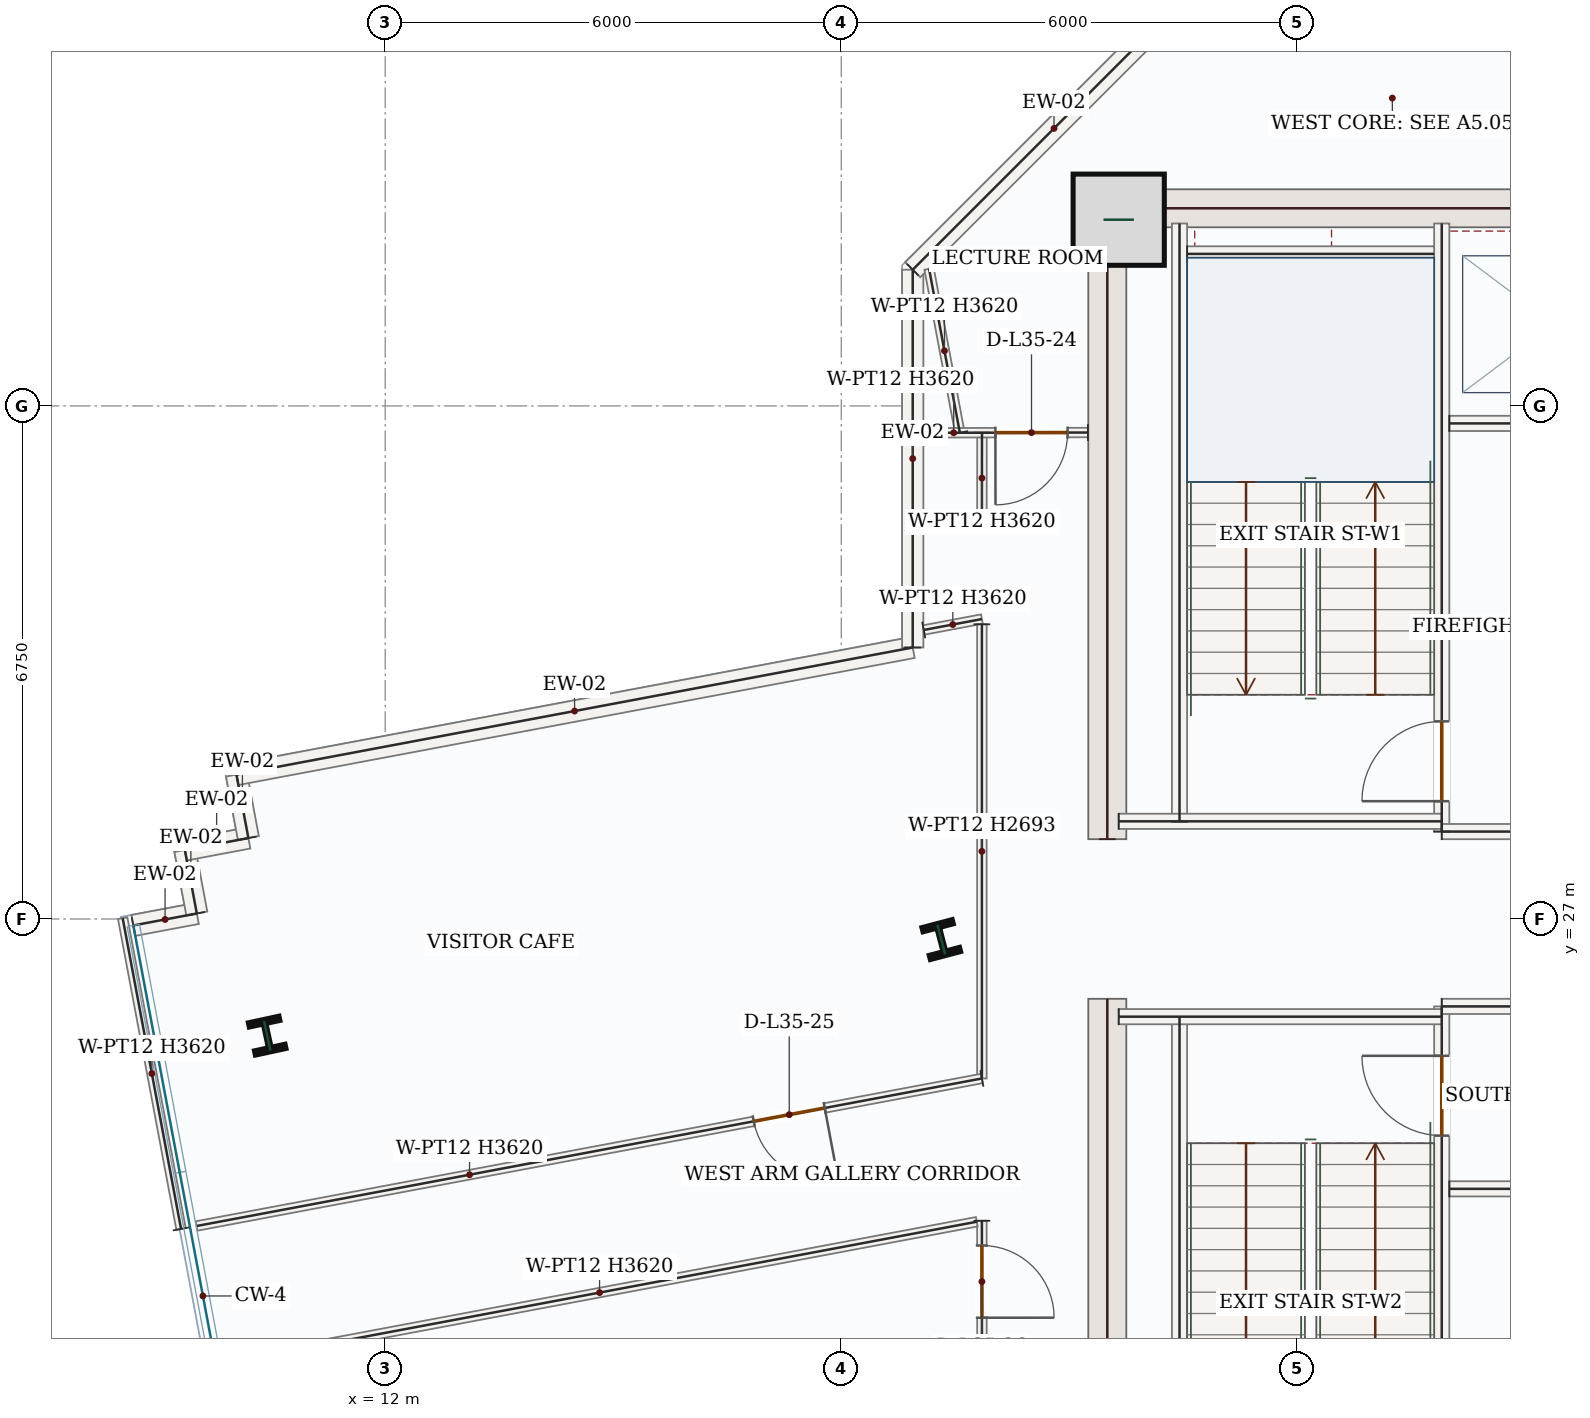
"""IFC4 building model, lengths in metres.
Left out: names, types, materials, properties, quantities, classifications, styles, units other than length and angle.
Written with IfcOpenShell. Run it as: python <this file> out.ifc"""

import sys

from ifc_helpers import new_model, si_unit, direction, frame, frame_2d, origin, origin_2d, place, context, subcontext, project, spatial, rectangle, i_section, extrude, source, transform, mapped, element, fill, save


model = new_model("IFC4")
c1 = context("Model", 3, precision=1e-05, world=origin(), true_north=direction((0.0, 1.0)))
c2 = subcontext(c1, "Body", "Model", "MODEL_VIEW")
j1 = project(units=[si_unit("LENGTHUNIT", "METRE"), si_unit("PLANEANGLEUNIT", "RADIAN")], contexts=[c1])
p1 = place(None, origin())
s1 = spatial("IfcSite", under=j1, at=p1, CompositionType="ELEMENT")
p2 = place(p1, origin())
s2 = spatial("IfcBuilding", under=s1, at=p2, CompositionType="ELEMENT")
p3 = place(p2, frame((0.0, 0.0, 155.1)))
s3 = spatial("IfcBuildingStorey", under=s2, at=p3, CompositionType="ELEMENT", Elevation=155.1)
m1 = source(origin(), c2, "Body", "SweptSolid", [
    extrude(rectangle(XDim=8.55, YDim=0.5, at=frame_2d((4.275, 0.0))), origin(), (0.0, 0.0, 1.0), 3.62),
])
for number, where, z_axis, x_axis in (
    (1, (21.5, 17.4, 0.0), (0.0, 0.0, 1.0), (0.0, 1.0, 0.0)),
    (2, (21.5, 28.05, 0.0), (0.0, 0.0, 1.0), (0.0, 1.0, 0.0)),
):
    element("IfcWall", number, at=place(p3, frame(where, z_axis=z_axis, x_axis=x_axis)), inside=s3, PredefinedType="SHEAR", context=c2, shape_type="MappedRepresentation", body=[
        mapped(m1, transform((0.0, 0.0, 0.0), x_axis=(1.0, 0.0, 0.0), y_axis=(0.0, 1.0, 0.0), z_axis=(0.0, 0.0, 1.0), scale=1.0)),
    ])
m2 = source(origin(), c2, "Body", "SweptSolid", [
    extrude(rectangle(XDim=7.0, YDim=0.5, at=frame_2d((3.5, 0.0))), origin(), (0.0, 0.0, 1.0), 3.62),
])
p4 = place(p3, frame((21.75, 36.35, 0.0), z_axis=(0.0, 0.0, 1.0), x_axis=(1.0, 0.0, 0.0)))
e3 = element("IfcWall", 3, at=p4, inside=s3, PredefinedType="SHEAR", context=c2, shape_type="MappedRepresentation", body=[
    mapped(m2, transform((0.0, 0.0, 0.0), x_axis=(1.0, 0.0, 0.0), y_axis=(0.0, 1.0, 0.0), z_axis=(0.0, 0.0, 1.0), scale=1.0)),
])
m3 = source(origin(), c2, "Body", "SweptSolid", [
    extrude(rectangle(XDim=1.2, YDim=1.2, at=origin_2d()), origin(), (0.0, 0.0, 1.0), 3.9),
])
p5 = place(p3, frame((21.65, 36.2, 0.0), z_axis=(0.0, 0.0, 1.0), x_axis=(1.0, 0.0, 0.0)))
e4 = element("IfcColumn", 4, at=p5, inside=s3, PredefinedType="COLUMN", context=c2, shape_type="MappedRepresentation", body=[
    mapped(m3, transform((0.0, 0.0, 0.0), x_axis=(1.0, 0.0, 0.0), y_axis=(0.0, 1.0, 0.0), z_axis=(0.0, 0.0, 1.0), scale=1.0)),
])
m4 = source(origin(), c2, "Body", "SweptSolid", [
    extrude(i_section(OverallWidth=0.412, OverallDepth=0.435, WebThickness=0.036, FlangeThickness=0.057, FilletRadius=0.018, at=origin_2d()), origin(), (0.0, 0.0, 1.0), 3.9),
])
for number, where, z_axis, x_axis in (
    (5, (19.316, 26.729, 0.0), (0.0, 0.0, 1.0), (0.967, 0.255, 0.0)),
    (6, (10.447, 25.465, 0.0), (0.0, 0.0, 1.0), (0.977, 0.211, 0.0)),
):
    element("IfcColumn", number, at=place(p3, frame(where, z_axis=z_axis, x_axis=x_axis)), inside=s3, PredefinedType="COLUMN", context=c2, shape_type="MappedRepresentation", body=[
        mapped(m4, transform((0.0, 0.0, 0.0), x_axis=(1.0, 0.0, 0.0), y_axis=(0.0, 1.0, 0.0), z_axis=(0.0, 0.0, 1.0), scale=1.0)),
    ])
m5 = source(origin(), c2, "Body", "SweptSolid", [
    extrude(rectangle(XDim=0.85, YDim=0.28, at=frame_2d((0.425, 0.0))), origin(), (0.0, 0.0, 1.0), 3.62),
])
for number, where, z_axis, x_axis in (
    (7, (8.686, 26.915, 0.0), (0.0, 0.0, 1.0), (0.983, 0.185, 0.0)),
    (8, (9.521, 27.072, 0.0), (0.0, 0.0, 1.0), (-0.185, 0.983, 0.0)),
):
    element("IfcWall", number, at=place(p3, frame(where, z_axis=z_axis, x_axis=x_axis)), inside=s3, PredefinedType="SOLIDWALL", context=c2, shape_type="MappedRepresentation", body=[
        mapped(m5, transform((0.0, 0.0, 0.0), x_axis=(1.0, 0.0, 0.0), y_axis=(0.0, 1.0, 0.0), z_axis=(0.0, 0.0, 1.0), scale=1.0)),
    ])
m6 = source(origin(), c2, "Body", "SweptSolid", [
    extrude(rectangle(XDim=0.85, YDim=0.28, at=frame_2d((0.425, 0.0))), origin(), (0.0, 0.0, 1.0), 3.62),
])
p6 = place(p3, frame((9.365, 27.908, 0.0), z_axis=(0.0, 0.0, 1.0), x_axis=(0.982790785128, 0.184722149909, 0.0)))
e9 = element("IfcWall", 9, at=p6, inside=s3, PredefinedType="SOLIDWALL", context=c2, shape_type="MappedRepresentation", body=[
    mapped(m6, transform((0.0, 0.0, 0.0), x_axis=(1.0, 0.0, 0.0), y_axis=(0.0, 1.0, 0.0), z_axis=(0.0, 0.0, 1.0), scale=1.0)),
])
p7 = place(p3, frame((10.2, 28.065, 0.0), z_axis=(0.0, 0.0, 1.0), x_axis=(-0.184392582027, 0.982852672425, 0.0)))
e10 = element("IfcWall", 10, at=p7, inside=s3, PredefinedType="SOLIDWALL", context=c2, shape_type="MappedRepresentation", body=[
    mapped(m5, transform((0.0, 0.0, 0.0), x_axis=(1.0, 0.0, 0.0), y_axis=(0.0, 1.0, 0.0), z_axis=(0.0, 0.0, 1.0), scale=1.0)),
])
m7 = source(origin(), c2, "Body", "SweptSolid", [
    extrude(rectangle(XDim=9.052, YDim=0.28, at=frame_2d((4.526, 0.0))), origin(), (0.0, 0.0, 1.0), 3.62),
])
p8 = place(p3, frame((10.043, 28.9, 0.0), z_axis=(0.0, 0.0, 1.0), x_axis=(0.982808012228, 0.184630471755, 0.0)))
e11 = element("IfcWall", 11, at=p8, inside=s3, PredefinedType="SOLIDWALL", context=c2, shape_type="MappedRepresentation", body=[
    mapped(m7, transform((0.0, 0.0, 0.0), x_axis=(1.0, 0.0, 0.0), y_axis=(0.0, 1.0, 0.0), z_axis=(0.0, 0.0, 1.0), scale=1.0)),
])
m8 = source(origin(), c2, "Body", "SweptSolid", [
    extrude(rectangle(XDim=4.97, YDim=0.28, at=frame_2d((2.485, 0.0))), origin(), (0.0, 0.0, 1.0), 3.62),
])
p9 = place(p3, frame((18.94, 30.572, 0.0), z_axis=(0.0, 0.0, 1.0), x_axis=(0.0, 1.0, 0.0)))
e12 = element("IfcWall", 12, at=p9, inside=s3, PredefinedType="SOLIDWALL", context=c2, shape_type="MappedRepresentation", body=[
    mapped(m8, transform((0.0, 0.0, 0.0), x_axis=(1.0, 0.0, 0.0), y_axis=(0.0, 1.0, 0.0), z_axis=(0.0, 0.0, 1.0), scale=1.0)),
])
m9 = source(origin(), c2, "Body", "SweptSolid", [
    extrude(rectangle(XDim=5.258, YDim=0.28, at=frame_2d((2.629, 0.0))), origin(), (0.0, 0.0, 1.0), 3.62),
])
p10 = place(p3, frame((18.94, 35.542, 0.0), z_axis=(0.0, 0.0, 1.0), x_axis=(0.707106781187, 0.707106781187, 0.0)))
e13 = element("IfcWall", 13, at=p10, inside=s3, PredefinedType="SOLIDWALL", context=c2, shape_type="MappedRepresentation", body=[
    mapped(m9, transform((0.0, 0.0, 0.0), x_axis=(1.0, 0.0, 0.0), y_axis=(0.0, 1.0, 0.0), z_axis=(0.0, 0.0, 1.0), scale=1.0)),
])
m10 = source(origin(), c2, "Body", "SweptSolid", [
    extrude(rectangle(XDim=7.87, YDim=0.2, at=frame_2d((3.935, 0.0))), origin(), (0.0, 0.0, 1.0), 3.62),
])
for number, where, z_axis, x_axis in (
    (14, (22.45, 17.85, 0.0), (0.0, 0.0, 1.0), (0.0, 1.0, 0.0)),
    (15, (22.45, 28.28, 0.0), (0.0, 0.0, 1.0), (0.0, 1.0, 0.0)),
):
    element("IfcWall", number, at=place(p3, frame(where, z_axis=z_axis, x_axis=x_axis)), inside=s3, PredefinedType="SOLIDWALL", context=c2, shape_type="MappedRepresentation", body=[
        mapped(m10, transform((0.0, 0.0, 0.0), x_axis=(1.0, 0.0, 0.0), y_axis=(0.0, 1.0, 0.0), z_axis=(0.0, 0.0, 1.0), scale=1.0)),
    ])
p11 = place(p3, frame((25.9, 17.85, 0.0), z_axis=(0.0, 0.0, 1.0), x_axis=(0.0, 1.0, 0.0)))
e16 = element("IfcWall", 16, at=p11, inside=s3, PredefinedType="SOLIDWALL", context=c2, shape_type="SweptSolid", body=[
    extrude(rectangle(XDim=8.0, YDim=0.2, at=frame_2d((4.0, 0.0))), origin(), (0.0, 0.0, 1.0), 3.62),
])
p12 = place(p11, frame((6.3, 0.0, 0.0)))
e17 = element("IfcOpeningElement", 17, at=p12, cuts=e16, PredefinedType="OPENING", context=c2, shape_type="SweptSolid", body=[
    extrude(rectangle(XDim=1.05, YDim=2.15, at=frame_2d((0.525, 1.075))), frame((0.0, 0.11, 0.0), z_axis=(0.0, -1.0, 0.0), x_axis=(1.0, 0.0, 0.0)), (0.0, 0.0, 1.0), 0.22),
])
p13 = place(p3, frame((25.9, 28.15, 0.0), z_axis=(0.0, 0.0, 1.0), x_axis=(0.0, 1.0, 0.0)))
e18 = element("IfcWall", 18, at=p13, inside=s3, PredefinedType="SOLIDWALL", context=c2, shape_type="SweptSolid", body=[
    extrude(rectangle(XDim=8.0, YDim=0.2, at=frame_2d((4.0, 0.0))), origin(), (0.0, 0.0, 1.0), 3.62),
])
p14 = place(p13, frame((0.4, 0.0, 0.0)))
e19 = element("IfcOpeningElement", 19, at=p14, cuts=e18, PredefinedType="OPENING", context=c2, shape_type="SweptSolid", body=[
    extrude(rectangle(XDim=1.05, YDim=2.15, at=frame_2d((0.525, 1.075))), frame((0.0, 0.11, 0.0), z_axis=(0.0, -1.0, 0.0), x_axis=(1.0, 0.0, 0.0)), (0.0, 0.0, 1.0), 0.22),
])
m11 = source(origin(), c2, "Body", "SweptSolid", [
    extrude(rectangle(XDim=4.25, YDim=0.2, at=frame_2d((2.125, 0.0))), origin(), (0.0, 0.0, 1.0), 3.62),
])
p15 = place(p3, frame((21.65, 25.715, 0.0), z_axis=(0.0, 0.0, 1.0), x_axis=(1.0, 0.0, 0.0)))
e20 = element("IfcWall", 20, at=p15, inside=s3, PredefinedType="SOLIDWALL", context=c2, shape_type="MappedRepresentation", body=[
    mapped(m11, transform((0.0, 0.0, 0.0), x_axis=(1.0, 0.0, 0.0), y_axis=(0.0, 1.0, 0.0), z_axis=(0.0, 0.0, 1.0), scale=1.0)),
])
m12 = source(origin(), c2, "Body", "SweptSolid", [
    extrude(rectangle(XDim=3.0, YDim=0.2, at=frame_2d((1.5, 0.0))), origin(), (0.0, 0.0, 1.0), 3.62),
])
p16 = place(p3, frame((25.9, 25.85, 0.0), z_axis=(0.0, 0.0, 1.0), x_axis=(1.0, 0.0, 0.0)))
e21 = element("IfcWall", 21, at=p16, inside=s3, PredefinedType="SOLIDWALL", context=c2, shape_type="MappedRepresentation", body=[
    mapped(m12, transform((0.0, 0.0, 0.0), x_axis=(1.0, 0.0, 0.0), y_axis=(0.0, 1.0, 0.0), z_axis=(0.0, 0.0, 1.0), scale=1.0)),
])
p17 = place(p3, frame((21.65, 28.285, 0.0), z_axis=(0.0, 0.0, 1.0), x_axis=(1.0, 0.0, 0.0)))
e22 = element("IfcWall", 22, at=p17, inside=s3, PredefinedType="SOLIDWALL", context=c2, shape_type="MappedRepresentation", body=[
    mapped(m11, transform((0.0, 0.0, 0.0), x_axis=(1.0, 0.0, 0.0), y_axis=(0.0, 1.0, 0.0), z_axis=(0.0, 0.0, 1.0), scale=1.0)),
])
p18 = place(p3, frame((25.9, 28.15, 0.0), z_axis=(0.0, 0.0, 1.0), x_axis=(1.0, 0.0, 0.0)))
e23 = element("IfcWall", 23, at=p18, inside=s3, PredefinedType="SOLIDWALL", context=c2, shape_type="MappedRepresentation", body=[
    mapped(m12, transform((0.0, 0.0, 0.0), x_axis=(1.0, 0.0, 0.0), y_axis=(0.0, 1.0, 0.0), z_axis=(0.0, 0.0, 1.0), scale=1.0)),
])
m13 = source(origin(), c2, "Body", "SweptSolid", [
    extrude(rectangle(XDim=3.25, YDim=0.2, at=frame_2d((1.625, 0.0))), origin(), (0.0, 0.0, 1.0), 3.62),
])
p19 = place(p3, frame((22.55, 35.75, 0.0), z_axis=(0.0, 0.0, 1.0), x_axis=(1.0, 0.0, 0.0)))
e24 = element("IfcWall", 24, at=p19, inside=s3, PredefinedType="SOLIDWALL", context=c2, shape_type="MappedRepresentation", body=[
    mapped(m13, transform((0.0, 0.0, 0.0), x_axis=(1.0, 0.0, 0.0), y_axis=(0.0, 1.0, 0.0), z_axis=(0.0, 0.0, 1.0), scale=1.0)),
])
p20 = place(p3, frame((26.0, 33.52, 0.0), z_axis=(0.0, 0.0, 1.0), x_axis=(1.0, 0.0, 0.0)))
e25 = element("IfcWall", 25, at=p20, inside=s3, PredefinedType="SOLIDWALL", context=c2, shape_type="SweptSolid", body=[
    extrude(rectangle(XDim=2.75, YDim=0.2, at=frame_2d((1.375, 0.0))), origin(), (0.0, 0.0, 1.0), 3.62),
])
p21 = place(p20, frame((0.82, 0.0, 0.0)))
e26 = element("IfcOpeningElement", 26, at=p21, cuts=e25, PredefinedType="OPENING", context=c2, shape_type="SweptSolid", body=[
    extrude(rectangle(XDim=1.1, YDim=2.15, at=frame_2d((0.55, 1.075))), frame((0.0, 0.11, 0.0), z_axis=(0.0, -1.0, 0.0), x_axis=(1.0, 0.0, 0.0)), (0.0, 0.0, 1.0), 0.22),
])
m14 = source(origin(), c2, "Body", "SweptSolid", [
    extrude(rectangle(XDim=2.75, YDim=0.2, at=frame_2d((1.375, 0.0))), origin(), (0.0, 0.0, 1.0), 3.62),
])
p22 = place(p3, frame((26.0, 23.45, 0.0), z_axis=(0.0, 0.0, 1.0), x_axis=(1.0, 0.0, 0.0)))
e27 = element("IfcWall", 27, at=p22, inside=s3, PredefinedType="SOLIDWALL", context=c2, shape_type="MappedRepresentation", body=[
    mapped(m14, transform((0.0, 0.0, 0.0), x_axis=(1.0, 0.0, 0.0), y_axis=(0.0, 1.0, 0.0), z_axis=(0.0, 0.0, 1.0), scale=1.0)),
])
m15 = source(origin(), c2, "Body", "SweptSolid", [
    extrude(rectangle(XDim=1.195, YDim=0.125, at=frame_2d((0.597, 0.0))), origin(), (0.0, 0.0, 1.0), 3.62),
])
p23 = place(p3, frame((19.851, 33.398, 0.0), z_axis=(0.0, 0.0, 1.0), x_axis=(-0.001021867441, -0.999999477893, 0.0)))
e28 = element("IfcWall", 28, at=p23, inside=s3, PredefinedType="PARTITIONING", context=c2, shape_type="MappedRepresentation", body=[
    mapped(m15, transform((0.0, 0.0, 0.0), x_axis=(1.0, 0.0, 0.0), y_axis=(0.0, 1.0, 0.0), z_axis=(0.0, 0.0, 1.0), scale=1.0)),
])
m16 = source(origin(), c2, "Body", "SweptSolid", [
    extrude(rectangle(XDim=2.192, YDim=0.125, at=frame_2d((1.096, 0.0))), origin(), (0.0, 0.0, 1.0), 3.62),
])
p24 = place(p3, frame((19.56, 33.398, 0.0), z_axis=(0.0, 0.0, 1.0), x_axis=(-0.184665106031, 0.982801505196, 0.0)))
e29 = element("IfcWall", 29, at=p24, inside=s3, PredefinedType="PARTITIONING", context=c2, shape_type="MappedRepresentation", body=[
    mapped(m16, transform((0.0, 0.0, 0.0), x_axis=(1.0, 0.0, 0.0), y_axis=(0.0, 1.0, 0.0), z_axis=(0.0, 0.0, 1.0), scale=1.0)),
])
p25 = place(p3, frame((21.245, 33.4, 0.0), z_axis=(0.0, 0.0, 1.0), x_axis=(-0.99999875384, -0.001578708001, 0.0)))
e30 = element("IfcWall", 30, at=p25, inside=s3, PredefinedType="PARTITIONING", context=c2, shape_type="SweptSolid", body=[
    extrude(rectangle(XDim=2.165, YDim=0.125, at=frame_2d((1.083, 0.0))), origin(), (0.0, 0.0, 1.0), 3.62),
])
p26 = place(p25, frame((0.267, 0.0, 0.0)))
e31 = element("IfcOpeningElement", 31, at=p26, cuts=e30, PredefinedType="OPENING", context=c2, shape_type="SweptSolid", body=[
    extrude(rectangle(XDim=0.95, YDim=2.15, at=frame_2d((0.475, 1.075))), frame((0.0, 0.073, 0.0), z_axis=(0.0, -1.0, 0.0), x_axis=(1.0, 0.0, 0.0)), (0.0, 0.0, 1.0), 0.145),
])
m17 = source(origin(), c2, "Body", "SweptSolid", [
    extrude(rectangle(XDim=4.16, YDim=0.125, at=frame_2d((2.08, 0.0))), origin(), (0.0, 0.0, 1.0), 3.62),
])
p27 = place(p3, frame((9.314, 22.923, 0.0), z_axis=(0.0, 0.0, 1.0), x_axis=(-0.184635785614, 0.982807013951, 0.0)))
e32 = element("IfcWall", 32, at=p27, inside=s3, PredefinedType="PARTITIONING", context=c2, shape_type="MappedRepresentation", body=[
    mapped(m17, transform((0.0, 0.0, 0.0), x_axis=(1.0, 0.0, 0.0), y_axis=(0.0, 1.0, 0.0), z_axis=(0.0, 0.0, 1.0), scale=1.0)),
])
m18 = source(origin(), c2, "Body", "SweptSolid", [
    extrude(rectangle(XDim=0.779, YDim=0.125, at=frame_2d((0.389, 0.0))), origin(), (0.0, 0.0, 1.0), 3.62),
])
p28 = place(p3, frame((19.085, 30.802, 0.0), z_axis=(0.0, 0.0, 1.0), x_axis=(0.982850878619, 0.184402143149, 0.0)))
e33 = element("IfcWall", 33, at=p28, inside=s3, PredefinedType="PARTITIONING", context=c2, shape_type="MappedRepresentation", body=[
    mapped(m18, transform((0.0, 0.0, 0.0), x_axis=(1.0, 0.0, 0.0), y_axis=(0.0, 1.0, 0.0), z_axis=(0.0, 0.0, 1.0), scale=1.0)),
])
m19 = source(origin(), c2, "Body", "SweptSolid", [
    extrude(rectangle(XDim=5.975, YDim=0.125, at=frame_2d((2.988, 0.0))), origin(), (0.0, 0.0, 1.0), 2.693),
])
p29 = place(p3, frame((19.85, 30.877, 0.0), z_axis=(0.0, 0.0, 1.0), x_axis=(0.0, -1.0, 0.0)))
e34 = element("IfcWall", 34, at=p29, inside=s3, PredefinedType="PARTITIONING", context=c2, shape_type="MappedRepresentation", body=[
    mapped(m19, transform((0.0, 0.0, 0.0), x_axis=(1.0, 0.0, 0.0), y_axis=(0.0, 1.0, 0.0), z_axis=(0.0, 0.0, 1.0), scale=1.0)),
])
p30 = place(p3, frame((19.85, 24.902, 0.0), z_axis=(0.0, 0.0, 1.0), x_axis=(-0.982804817995, -0.184647474194, 0.0)))
e35 = element("IfcWall", 35, at=p30, inside=s3, PredefinedType="PARTITIONING", context=c2, shape_type="SweptSolid", body=[
    extrude(rectangle(XDim=10.513, YDim=0.125, at=frame_2d((5.256, 0.0))), origin(), (0.0, 0.0, 1.0), 3.62),
])
p31 = place(p30, frame((2.104, 0.0, 0.0)))
e36 = element("IfcOpeningElement", 36, at=p31, cuts=e35, PredefinedType="OPENING", context=c2, shape_type="SweptSolid", body=[
    extrude(rectangle(XDim=0.95, YDim=2.15, at=frame_2d((0.475, 1.075))), frame((0.0, 0.073, 0.0), z_axis=(0.0, -1.0, 0.0), x_axis=(1.0, 0.0, 0.0)), (0.0, 0.0, 1.0), 0.145),
])
p32 = place(p3, frame((19.85, 23.03, 0.0), z_axis=(0.0, 0.0, 1.0), x_axis=(0.00040209084, -0.999999919161, 0.0)))
e37 = element("IfcWall", 37, at=p32, inside=s3, PredefinedType="PARTITIONING", context=c2, shape_type="SweptSolid", body=[
    extrude(rectangle(XDim=2.429, YDim=0.125, at=frame_2d((1.214, 0.0))), origin(), (0.0, 0.0, 1.0), 3.079),
])
p33 = place(p32, frame((0.325, 0.0, 0.0)))
e38 = element("IfcOpeningElement", 38, at=p33, cuts=e37, PredefinedType="OPENING", context=c2, shape_type="SweptSolid", body=[
    extrude(rectangle(XDim=0.95, YDim=2.15, at=frame_2d((0.475, 1.075))), frame((0.0, 0.073, 0.0), z_axis=(0.0, -1.0, 0.0), x_axis=(1.0, 0.0, 0.0)), (0.0, 0.0, 1.0), 0.145),
])
m20 = source(origin(), c2, "Body", "SweptSolid", [
    extrude(rectangle(XDim=10.098, YDim=0.125, at=frame_2d((5.049, 0.0))), origin(), (0.0, 0.0, 1.0), 3.62),
])
p34 = place(p3, frame((9.858, 21.153, 0.0), z_axis=(0.0, 0.0, 1.0), x_axis=(0.982807535277, 0.1846330106, 0.0)))
e39 = element("IfcWall", 39, at=p34, inside=s3, PredefinedType="PARTITIONING", context=c2, shape_type="MappedRepresentation", body=[
    mapped(m20, transform((0.0, 0.0, 0.0), x_axis=(1.0, 0.0, 0.0), y_axis=(0.0, 1.0, 0.0), z_axis=(0.0, 0.0, 1.0), scale=1.0)),
])
m21 = source(origin(), c2, "Body", "SweptSolid", [
    extrude(rectangle(XDim=1.05, YDim=2.15, at=frame_2d((0.525, 1.075))), frame((0.0, 0.025, 0.0), z_axis=(0.0, -1.0, 0.0), x_axis=(1.0, 0.0, 0.0)), (0.0, 0.0, 1.0), 0.05),
])
p35 = place(p14, origin())
e40 = element("IfcDoor", 40, at=p35, inside=s3, OperationType="SINGLE_SWING_LEFT", PredefinedType="DOOR", context=c2, shape_type="MappedRepresentation", body=[
    mapped(m21, transform((0.0, 0.0, 0.0), x_axis=(1.0, 0.0, 0.0), y_axis=(0.0, 1.0, 0.0), z_axis=(0.0, 0.0, 1.0), scale=1.0)),
])
fill(e19, e40)
p36 = place(p12, origin())
e41 = element("IfcDoor", 41, at=p36, inside=s3, OperationType="SINGLE_SWING_RIGHT", PredefinedType="DOOR", context=c2, shape_type="MappedRepresentation", body=[
    mapped(m21, transform((0.0, 0.0, 0.0), x_axis=(1.0, 0.0, 0.0), y_axis=(0.0, 1.0, 0.0), z_axis=(0.0, 0.0, 1.0), scale=1.0)),
])
fill(e17, e41)
m22 = source(origin(), c2, "Body", "SweptSolid", [
    extrude(rectangle(XDim=0.95, YDim=2.15, at=frame_2d((0.475, 1.075))), frame((0.0, 0.025, 0.0), z_axis=(0.0, -1.0, 0.0), x_axis=(1.0, 0.0, 0.0)), (0.0, 0.0, 1.0), 0.05),
])
p37 = place(p26, origin())
e42 = element("IfcDoor", 42, at=p37, inside=s3, OperationType="SINGLE_SWING_RIGHT", PredefinedType="DOOR", context=c2, shape_type="MappedRepresentation", body=[
    mapped(m22, transform((0.0, 0.0, 0.0), x_axis=(1.0, 0.0, 0.0), y_axis=(0.0, 1.0, 0.0), z_axis=(0.0, 0.0, 1.0), scale=1.0)),
])
fill(e31, e42)
p38 = place(p31, origin())
e43 = element("IfcDoor", 43, at=p38, inside=s3, OperationType="SINGLE_SWING_LEFT", PredefinedType="DOOR", context=c2, shape_type="MappedRepresentation", body=[
    mapped(m22, transform((0.0, 0.0, 0.0), x_axis=(1.0, 0.0, 0.0), y_axis=(0.0, 1.0, 0.0), z_axis=(0.0, 0.0, 1.0), scale=1.0)),
])
fill(e36, e43)
p39 = place(p33, origin())
e44 = element("IfcDoor", 44, at=p39, inside=s3, OperationType="SINGLE_SWING_RIGHT", PredefinedType="DOOR", context=c2, shape_type="MappedRepresentation", body=[
    mapped(m22, transform((0.0, 0.0, 0.0), x_axis=(1.0, 0.0, 0.0), y_axis=(0.0, 1.0, 0.0), z_axis=(0.0, 0.0, 1.0), scale=1.0)),
])
fill(e38, e44)
save(model, sys.argv[1])
